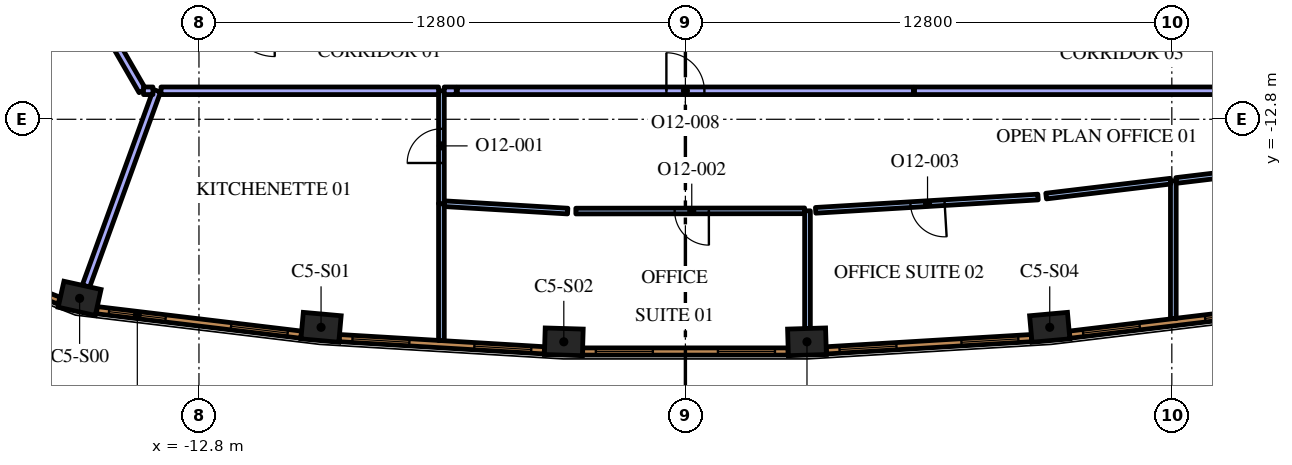
"""IFC4 building model, lengths in metres.
Left out: names, types, materials, properties, quantities, classifications, styles, units other than length and angle.
Written with IfcOpenShell. Run it as: python <this file> out.ifc"""

import sys

from ifc_helpers import new_model, si_unit, direction, frame, frame_2d, origin, origin_2d, place, context, subcontext, project, spatial, rectangle, extrude, element, fill, save


model = new_model("IFC4")
c1 = context("Model", 3, precision=1e-05, world=origin(), true_north=direction((0.0, 1.0)))
c2 = subcontext(c1, "Body", "Model", "MODEL_VIEW")
j1 = project(units=[si_unit("LENGTHUNIT", "METRE"), si_unit("PLANEANGLEUNIT", "RADIAN")], contexts=[c1])
p1 = place(None, origin())
s1 = spatial("IfcSite", under=j1, at=p1, CompositionType="ELEMENT")
p2 = place(p1, origin())
s2 = spatial("IfcBuilding", under=s1, at=p2, CompositionType="ELEMENT")
p3 = place(p2, frame((0.0, 0.0, 283.8)))
s3 = spatial("IfcBuildingStorey", under=s2, at=p3, CompositionType="ELEMENT", Elevation=283.8)
for number, where, z_axis, x_axis in (
    (1, (-15.941, -17.512, 0.0), (0.0, 0.0, 1.0), (0.976, -0.217, 0.0)),
    (2, (-9.587, -18.274, 0.0), (0.0, 0.0, 1.0), (0.996, -0.089, 0.0)),
    (3, (-3.199, -18.655, 0.0), (0.0, 0.0, 1.0), (1.0, -0.03, 0.0)),
    (4, (3.199, -18.655, 0.0), (0.0, 0.0, 1.0), (1.0, 0.03, 0.0)),
    (5, (9.587, -18.274, 0.0), (0.0, 0.0, 1.0), (0.996, 0.089, 0.0)),
):
    element("IfcColumn", number, at=place(p3, frame(where, z_axis=z_axis, x_axis=x_axis)), inside=s3, PredefinedType="COLUMN", context=c2, shape_type="SweptSolid", body=[
        extrude(rectangle(XDim=1.0, YDim=0.7, at=origin_2d()), origin(), (0.0, 0.0, 1.0), 4.2),
    ])
p4 = place(p3, frame((-6.42, -15.013, 0.0), z_axis=(0.0, 0.0, 1.0), x_axis=(0.0, -1.0, 0.0)))
e6 = element("IfcWall", 6, at=p4, inside=s3, PredefinedType="PARTITIONING", context=c2, shape_type="SweptSolid", body=[
    extrude(rectangle(XDim=3.61, YDim=0.15, at=frame_2d((1.805, 0.0))), origin(), (0.0, 0.0, 1.0), 3.55),
])
p5 = place(p3, frame((-6.42, -15.021, 0.0), z_axis=(0.0, 0.0, 1.0), x_axis=(0.0, 1.0, 0.0)))
e7 = element("IfcWall", 7, at=p5, inside=s3, PredefinedType="PARTITIONING", context=c2, shape_type="SweptSolid", body=[
    extrude(rectangle(XDim=2.971, YDim=0.15, at=frame_2d((1.485, 0.0))), origin(), (0.0, 0.0, 1.0), 3.55),
])
p6 = place(p5, frame((1.071, 0.0, 0.0)))
e8 = element("IfcOpeningElement", 8, at=p6, cuts=e7, PredefinedType="OPENING", context=c2, shape_type="SweptSolid", body=[
    extrude(rectangle(XDim=0.9, YDim=2.1, at=frame_2d((0.45, 1.05))), frame((0.0, 0.085, 0.0), z_axis=(0.0, -1.0, 0.0), x_axis=(1.0, 0.0, 0.0)), (0.0, 0.0, 1.0), 0.17),
])
p7 = place(p3, frame((-15.774, -17.19, 0.0), z_axis=(0.0, 0.0, 1.0), x_axis=(0.341821907823, 0.93976474893, 0.0)))
e9 = element("IfcWall", 9, at=p7, inside=s3, PredefinedType="PARTITIONING", context=c2, shape_type="SweptSolid", body=[
    extrude(rectangle(XDim=5.469, YDim=0.2, at=frame_2d((2.735, 0.0))), origin(), (0.0, 0.0, 1.0), 3.55),
])
p8 = place(p3, frame((-13.799, -12.05, 0.0), z_axis=(0.0, 0.0, 1.0), x_axis=(1.0, 0.0, 0.0)))
e10 = element("IfcWall", 10, at=p8, inside=s3, PredefinedType="PARTITIONING", context=c2, shape_type="SweptSolid", body=[
    extrude(rectangle(XDim=7.303, YDim=0.2, at=frame_2d((3.652, 0.0))), origin(), (0.0, 0.0, 1.0), 3.55),
])
p9 = place(p3, frame((3.213, -15.208, 0.0), z_axis=(0.0, 0.0, 1.0), x_axis=(0.0, -1.0, 0.0)))
e11 = element("IfcWall", 11, at=p9, inside=s3, PredefinedType="PARTITIONING", context=c2, shape_type="SweptSolid", body=[
    extrude(rectangle(XDim=3.096, YDim=0.15, at=frame_2d((1.548, 0.0))), origin(), (0.0, 0.0, 1.0), 3.55),
])
p10 = place(p3, frame((-6.345, -15.021, 0.0), z_axis=(0.0, 0.0, 1.0), x_axis=(0.998224081041, -0.059570832044, 0.0)))
e12 = element("IfcWall", 12, at=p10, inside=s3, PredefinedType="PARTITIONING", context=c2, shape_type="SweptSolid", body=[
    extrude(rectangle(XDim=3.254, YDim=0.15, at=frame_2d((1.627, 0.0))), origin(), (0.0, 0.0, 1.0), 3.55),
])
p11 = place(p3, frame((3.138, -15.208, 0.0), z_axis=(0.0, 0.0, 1.0), x_axis=(-0.999999400608, -0.001094889855, 0.0)))
e13 = element("IfcWall", 13, at=p11, inside=s3, PredefinedType="PARTITIONING", context=c2, shape_type="SweptSolid", body=[
    extrude(rectangle(XDim=6.021, YDim=0.15, at=frame_2d((3.01, 0.0))), origin(), (0.0, 0.0, 1.0), 3.55),
])
p12 = place(p11, frame((2.521, 0.0, 0.0)))
e14 = element("IfcOpeningElement", 14, at=p12, cuts=e13, PredefinedType="OPENING", context=c2, shape_type="SweptSolid", body=[
    extrude(rectangle(XDim=0.9, YDim=2.1, at=frame_2d((0.45, 1.05))), frame((0.0, 0.085, 0.0), z_axis=(0.0, -1.0, 0.0), x_axis=(1.0, 0.0, 0.0)), (0.0, 0.0, 1.0), 0.17),
])
p13 = place(p3, frame((12.839, -14.419, 0.0), z_axis=(0.0, 0.0, 1.0), x_axis=(0.0, -1.0, 0.0)))
e15 = element("IfcWall", 15, at=p13, inside=s3, PredefinedType="PARTITIONING", context=c2, shape_type="SweptSolid", body=[
    extrude(rectangle(XDim=3.626, YDim=0.15, at=frame_2d((1.813, 0.0))), origin(), (0.0, 0.0, 1.0), 3.55),
])
p14 = place(p3, frame((9.28, -14.846, 0.0), z_axis=(0.0, 0.0, 1.0), x_axis=(-0.998220544688, -0.059630060904, 0.0)))
e16 = element("IfcWall", 16, at=p14, inside=s3, PredefinedType="PARTITIONING", context=c2, shape_type="SweptSolid", body=[
    extrude(rectangle(XDim=5.863, YDim=0.15, at=frame_2d((2.932, 0.0))), origin(), (0.0, 0.0, 1.0), 3.55),
])
p15 = place(p14, frame((2.463, 0.0, 0.0)))
e17 = element("IfcOpeningElement", 17, at=p15, cuts=e16, PredefinedType="OPENING", context=c2, shape_type="SweptSolid", body=[
    extrude(rectangle(XDim=0.9, YDim=2.1, at=frame_2d((0.45, 1.05))), frame((0.0, 0.085, 0.0), z_axis=(0.0, -1.0, 0.0), x_axis=(1.0, 0.0, 0.0)), (0.0, 0.0, 1.0), 0.17),
])
p16 = place(p3, frame((9.492, -14.82, 0.0), z_axis=(0.0, 0.0, 1.0), x_axis=(0.992887701721, 0.119054658757, 0.0)))
e18 = element("IfcWall", 18, at=p16, inside=s3, PredefinedType="PARTITIONING", context=c2, shape_type="SweptSolid", body=[
    extrude(rectangle(XDim=3.295, YDim=0.15, at=frame_2d((1.648, 0.0))), origin(), (0.0, 0.0, 1.0), 3.55),
])
p17 = place(p3, frame((12.914, -14.41, 0.0), z_axis=(0.0, 0.0, 1.0), x_axis=(0.99288472801, 0.119079456181, 0.0)))
e19 = element("IfcWall", 19, at=p17, inside=s3, PredefinedType="PARTITIONING", context=c2, shape_type="SweptSolid", body=[
    extrude(rectangle(XDim=2.196, YDim=0.15, at=frame_2d((1.098, 0.0))), origin(), (0.0, 0.0, 1.0), 3.55),
])
p18 = place(p3, frame((-6.0, -12.05, 0.0), z_axis=(0.0, 0.0, 1.0), x_axis=(1.0, 0.0, 0.0)))
e20 = element("IfcWall", 20, at=p18, inside=s3, PredefinedType="PARTITIONING", context=c2, shape_type="SweptSolid", body=[
    extrude(rectangle(XDim=12.0, YDim=0.2, at=frame_2d((6.0, 0.0))), origin(), (0.0, 0.0, 1.0), 3.55),
])
p19 = place(p18, frame((5.5, 0.0, 0.0)))
e21 = element("IfcOpeningElement", 21, at=p19, cuts=e20, PredefinedType="OPENING", context=c2, shape_type="SweptSolid", body=[
    extrude(rectangle(XDim=1.0, YDim=2.1, at=frame_2d((0.5, 1.05))), frame((0.0, 0.11, 0.0), z_axis=(0.0, -1.0, 0.0), x_axis=(1.0, 0.0, 0.0)), (0.0, 0.0, 1.0), 0.22),
])
p20 = place(p3, frame((-6.345, -12.05, 0.0), z_axis=(0.0, 0.0, 1.0), x_axis=(1.0, 0.0, 0.0)))
e22 = element("IfcWall", 22, at=p20, inside=s3, PredefinedType="PARTITIONING", context=c2, shape_type="SweptSolid", body=[
    extrude(rectangle(XDim=0.315, YDim=0.2, at=frame_2d((0.158, 0.0))), origin(), (0.0, 0.0, 1.0), 3.55),
])
p21 = place(p3, frame((6.03, -12.05, 0.0), z_axis=(0.0, 0.0, 1.0), x_axis=(1.0, 0.0, 0.0)))
e23 = element("IfcWall", 23, at=p21, inside=s3, PredefinedType="PARTITIONING", context=c2, shape_type="SweptSolid", body=[
    extrude(rectangle(XDim=8.259, YDim=0.2, at=frame_2d((4.13, 0.0))), origin(), (0.0, 0.0, 1.0), 3.55),
])
p22 = place(p3, frame((-17.218, -6.978, 0.0), z_axis=(0.0, 0.0, 1.0), x_axis=(0.500012299885, -0.866018302326, 0.0)))
e24 = element("IfcWall", 24, at=p22, inside=s3, PredefinedType="PARTITIONING", context=c2, shape_type="SweptSolid", body=[
    extrude(rectangle(XDim=5.857, YDim=0.2, at=frame_2d((2.929, 0.0))), origin(), (0.0, 0.0, 1.0), 3.55),
])
p23 = place(p3, frame((-14.26, -12.05, 0.0), z_axis=(0.0, 0.0, 1.0), x_axis=(1.0, 0.0, 0.0)))
e25 = element("IfcWall", 25, at=p23, inside=s3, PredefinedType="PARTITIONING", context=c2, shape_type="SweptSolid", body=[
    extrude(rectangle(XDim=0.248, YDim=0.2, at=frame_2d((0.124, 0.0))), origin(), (0.0, 0.0, 1.0), 3.55),
])
p24 = place(p3, frame((-15.487, -17.823, 0.0), z_axis=(0.0, 0.0, 1.0), x_axis=(0.992885582795, -0.119072328769, 0.0)))
e26 = element("IfcWall", 26, at=p24, inside=s3, PredefinedType="SOLIDWALL", context=c2, shape_type="SweptSolid", body=[
    extrude(rectangle(XDim=5.415, YDim=0.19, at=frame_2d((2.708, 0.0))), origin(), (0.0, 0.0, 1.0), 3.95),
])
p25 = place(p24, frame((0.323, 0.0, 0.6)))
e27 = element("IfcOpeningElement", 27, at=p25, cuts=e26, PredefinedType="OPENING", context=c2, shape_type="SweptSolid", body=[
    extrude(rectangle(XDim=1.5, YDim=2.85, at=frame_2d((0.75, 1.425))), frame((0.0, 0.105, 0.0), z_axis=(0.0, -1.0, 0.0), x_axis=(1.0, 0.0, 0.0)), (0.0, 0.0, 1.0), 0.21),
])
p26 = place(p24, frame((3.558, 0.0, 0.6)))
e28 = element("IfcOpeningElement", 28, at=p26, cuts=e26, PredefinedType="OPENING", context=c2, shape_type="SweptSolid", body=[
    extrude(rectangle(XDim=1.5, YDim=2.85, at=frame_2d((0.75, 1.425))), frame((0.0, 0.105, 0.0), z_axis=(0.0, -1.0, 0.0), x_axis=(1.0, 0.0, 0.0)), (0.0, 0.0, 1.0), 0.21),
])
p27 = place(p3, frame((-9.107, -18.558, 0.0), z_axis=(0.0, 0.0, 1.0), x_axis=(0.998221492823, -0.059614186786, 0.0)))
e29 = element("IfcWall", 29, at=p27, inside=s3, PredefinedType="SOLIDWALL", context=c2, shape_type="SweptSolid", body=[
    extrude(rectangle(XDim=5.406, YDim=0.19, at=frame_2d((2.703, 0.0))), origin(), (0.0, 0.0, 1.0), 3.95),
])
p28 = place(p27, frame((0.346, 0.0, 0.6)))
e30 = element("IfcOpeningElement", 30, at=p28, cuts=e29, PredefinedType="OPENING", context=c2, shape_type="SweptSolid", body=[
    extrude(rectangle(XDim=1.5, YDim=2.85, at=frame_2d((0.75, 1.425))), frame((0.0, 0.105, 0.0), z_axis=(0.0, -1.0, 0.0), x_axis=(1.0, 0.0, 0.0)), (0.0, 0.0, 1.0), 0.21),
])
p29 = place(p27, frame((3.559, 0.0, 0.6)))
e31 = element("IfcOpeningElement", 31, at=p29, cuts=e29, PredefinedType="OPENING", context=c2, shape_type="SweptSolid", body=[
    extrude(rectangle(XDim=1.5, YDim=2.85, at=frame_2d((0.75, 1.425))), frame((0.0, 0.105, 0.0), z_axis=(0.0, -1.0, 0.0), x_axis=(1.0, 0.0, 0.0)), (0.0, 0.0, 1.0), 0.21),
])
p30 = place(p3, frame((-2.703, -18.91, 0.0), z_axis=(0.0, 0.0, 1.0), x_axis=(1.0, 0.0, 0.0)))
e32 = element("IfcWall", 32, at=p30, inside=s3, PredefinedType="SOLIDWALL", context=c2, shape_type="SweptSolid", body=[
    extrude(rectangle(XDim=5.406, YDim=0.19, at=frame_2d((2.703, 0.0))), origin(), (0.0, 0.0, 1.0), 3.95),
])
p31 = place(p30, frame((0.346, 0.0, 0.6)))
e33 = element("IfcOpeningElement", 33, at=p31, cuts=e32, PredefinedType="OPENING", context=c2, shape_type="SweptSolid", body=[
    extrude(rectangle(XDim=1.5, YDim=2.85, at=frame_2d((0.75, 1.425))), frame((0.0, 0.105, 0.0), z_axis=(0.0, -1.0, 0.0), x_axis=(1.0, 0.0, 0.0)), (0.0, 0.0, 1.0), 0.21),
])
p32 = place(p30, frame((3.56, 0.0, 0.6)))
e34 = element("IfcOpeningElement", 34, at=p32, cuts=e32, PredefinedType="OPENING", context=c2, shape_type="SweptSolid", body=[
    extrude(rectangle(XDim=1.5, YDim=2.85, at=frame_2d((0.75, 1.425))), frame((0.0, 0.105, 0.0), z_axis=(0.0, -1.0, 0.0), x_axis=(1.0, 0.0, 0.0)), (0.0, 0.0, 1.0), 0.21),
])
p33 = place(p3, frame((3.71, -18.88, 0.0), z_axis=(0.0, 0.0, 1.0), x_axis=(0.998221492823, 0.059614186786, 0.0)))
e35 = element("IfcWall", 35, at=p33, inside=s3, PredefinedType="SOLIDWALL", context=c2, shape_type="SweptSolid", body=[
    extrude(rectangle(XDim=5.406, YDim=0.19, at=frame_2d((2.703, 0.0))), origin(), (0.0, 0.0, 1.0), 3.95),
])
p34 = place(p33, frame((0.346, 0.0, 0.6)))
e36 = element("IfcOpeningElement", 36, at=p34, cuts=e35, PredefinedType="OPENING", context=c2, shape_type="SweptSolid", body=[
    extrude(rectangle(XDim=1.5, YDim=2.85, at=frame_2d((0.75, 1.425))), frame((0.0, 0.105, 0.0), z_axis=(0.0, -1.0, 0.0), x_axis=(1.0, 0.0, 0.0)), (0.0, 0.0, 1.0), 0.21),
])
p35 = place(p33, frame((3.559, 0.0, 0.6)))
e37 = element("IfcOpeningElement", 37, at=p35, cuts=e35, PredefinedType="OPENING", context=c2, shape_type="SweptSolid", body=[
    extrude(rectangle(XDim=1.5, YDim=2.85, at=frame_2d((0.75, 1.425))), frame((0.0, 0.105, 0.0), z_axis=(0.0, -1.0, 0.0), x_axis=(1.0, 0.0, 0.0)), (0.0, 0.0, 1.0), 0.21),
])
p36 = place(p3, frame((10.111, -18.468, 0.0), z_axis=(0.0, 0.0, 1.0), x_axis=(0.992885582795, 0.119072328769, 0.0)))
e38 = element("IfcWall", 38, at=p36, inside=s3, PredefinedType="SOLIDWALL", context=c2, shape_type="SweptSolid", body=[
    extrude(rectangle(XDim=5.415, YDim=0.19, at=frame_2d((2.708, 0.0))), origin(), (0.0, 0.0, 1.0), 3.95),
])
p37 = place(p36, frame((0.357, 0.0, 0.6)))
e39 = element("IfcOpeningElement", 39, at=p37, cuts=e38, PredefinedType="OPENING", context=c2, shape_type="SweptSolid", body=[
    extrude(rectangle(XDim=1.5, YDim=2.85, at=frame_2d((0.75, 1.425))), frame((0.0, 0.105, 0.0), z_axis=(0.0, -1.0, 0.0), x_axis=(1.0, 0.0, 0.0)), (0.0, 0.0, 1.0), 0.21),
])
p38 = place(p36, frame((3.593, 0.0, 0.6)))
e40 = element("IfcOpeningElement", 40, at=p38, cuts=e38, PredefinedType="OPENING", context=c2, shape_type="SweptSolid", body=[
    extrude(rectangle(XDim=1.5, YDim=2.85, at=frame_2d((0.75, 1.425))), frame((0.0, 0.105, 0.0), z_axis=(0.0, -1.0, 0.0), x_axis=(1.0, 0.0, 0.0)), (0.0, 0.0, 1.0), 0.21),
])
p39 = place(p3, frame((-19.496, -16.392, 0.0), z_axis=(0.0, 0.0, 1.0), x_axis=(0.93100888477, -0.364996515709, 0.0)))
e41 = element("IfcWall", 41, at=p39, inside=s3, PredefinedType="SOLIDWALL", context=c2, shape_type="SweptSolid", body=[
    extrude(rectangle(XDim=3.237, YDim=0.19, at=frame_2d((1.618, 0.0))), origin(), (0.0, 0.0, 1.0), 3.95),
])
p40 = place(p39, frame((1.068, 0.0, 0.6)))
e42 = element("IfcOpeningElement", 42, at=p40, cuts=e41, PredefinedType="OPENING", context=c2, shape_type="SweptSolid", body=[
    extrude(rectangle(XDim=1.1, YDim=2.85, at=frame_2d((0.55, 1.425))), frame((0.0, 0.105, 0.0), z_axis=(0.0, -1.0, 0.0), x_axis=(1.0, 0.0, 0.0)), (0.0, 0.0, 1.0), 0.21),
])
p41 = place(p6, origin())
e43 = element("IfcDoor", 43, at=p41, inside=s3, OperationType="SINGLE_SWING_RIGHT", PredefinedType="DOOR", context=c2, shape_type="SweptSolid", body=[
    extrude(rectangle(XDim=0.9, YDim=2.1, at=frame_2d((0.45, 1.05))), frame((0.0, 0.025, 0.0), z_axis=(0.0, -1.0, 0.0), x_axis=(1.0, 0.0, 0.0)), (0.0, 0.0, 1.0), 0.05),
])
fill(e8, e43)
p42 = place(p12, origin())
e44 = element("IfcDoor", 44, at=p42, inside=s3, OperationType="SINGLE_SWING_LEFT", PredefinedType="DOOR", context=c2, shape_type="SweptSolid", body=[
    extrude(rectangle(XDim=0.9, YDim=2.1, at=frame_2d((0.45, 1.05))), frame((0.0, 0.025, 0.0), z_axis=(0.0, -1.0, 0.0), x_axis=(1.0, 0.0, 0.0)), (0.0, 0.0, 1.0), 0.05),
])
fill(e14, e44)
p43 = place(p15, origin())
e45 = element("IfcDoor", 45, at=p43, inside=s3, OperationType="SINGLE_SWING_LEFT", PredefinedType="DOOR", context=c2, shape_type="SweptSolid", body=[
    extrude(rectangle(XDim=0.9, YDim=2.1, at=frame_2d((0.45, 1.05))), frame((0.0, 0.025, 0.0), z_axis=(0.0, -1.0, 0.0), x_axis=(1.0, 0.0, 0.0)), (0.0, 0.0, 1.0), 0.05),
])
fill(e17, e45)
p44 = place(p19, origin())
e46 = element("IfcDoor", 46, at=p44, inside=s3, OperationType="SINGLE_SWING_RIGHT", PredefinedType="DOOR", context=c2, shape_type="SweptSolid", body=[
    extrude(rectangle(XDim=1.0, YDim=2.1, at=frame_2d((0.5, 1.05))), frame((0.0, 0.025, 0.0), z_axis=(0.0, -1.0, 0.0), x_axis=(1.0, 0.0, 0.0)), (0.0, 0.0, 1.0), 0.05),
])
fill(e21, e46)
p45 = place(p25, origin())
e47 = element("IfcWindow", 47, at=p45, inside=s3, PartitioningType="SINGLE_PANEL", PredefinedType="WINDOW", context=c2, shape_type="SweptSolid", body=[
    extrude(rectangle(XDim=1.5, YDim=2.85, at=frame_2d((0.75, 1.425))), frame((0.0, 0.045, 0.0), z_axis=(0.0, -1.0, 0.0), x_axis=(1.0, 0.0, 0.0)), (0.0, 0.0, 1.0), 0.06),
])
fill(e27, e47)
p46 = place(p26, origin())
e48 = element("IfcWindow", 48, at=p46, inside=s3, PartitioningType="SINGLE_PANEL", PredefinedType="WINDOW", context=c2, shape_type="SweptSolid", body=[
    extrude(rectangle(XDim=1.5, YDim=2.85, at=frame_2d((0.75, 1.425))), frame((0.0, 0.045, 0.0), z_axis=(0.0, -1.0, 0.0), x_axis=(1.0, 0.0, 0.0)), (0.0, 0.0, 1.0), 0.06),
])
fill(e28, e48)
p47 = place(p28, origin())
e49 = element("IfcWindow", 49, at=p47, inside=s3, PartitioningType="SINGLE_PANEL", PredefinedType="WINDOW", context=c2, shape_type="SweptSolid", body=[
    extrude(rectangle(XDim=1.5, YDim=2.85, at=frame_2d((0.75, 1.425))), frame((0.0, 0.045, 0.0), z_axis=(0.0, -1.0, 0.0), x_axis=(1.0, 0.0, 0.0)), (0.0, 0.0, 1.0), 0.06),
])
fill(e30, e49)
p48 = place(p29, origin())
e50 = element("IfcWindow", 50, at=p48, inside=s3, PartitioningType="SINGLE_PANEL", PredefinedType="WINDOW", context=c2, shape_type="SweptSolid", body=[
    extrude(rectangle(XDim=1.5, YDim=2.85, at=frame_2d((0.75, 1.425))), frame((0.0, 0.045, 0.0), z_axis=(0.0, -1.0, 0.0), x_axis=(1.0, 0.0, 0.0)), (0.0, 0.0, 1.0), 0.06),
])
fill(e31, e50)
p49 = place(p31, origin())
e51 = element("IfcWindow", 51, at=p49, inside=s3, PartitioningType="SINGLE_PANEL", PredefinedType="WINDOW", context=c2, shape_type="SweptSolid", body=[
    extrude(rectangle(XDim=1.5, YDim=2.85, at=frame_2d((0.75, 1.425))), frame((0.0, 0.045, 0.0), z_axis=(0.0, -1.0, 0.0), x_axis=(1.0, 0.0, 0.0)), (0.0, 0.0, 1.0), 0.06),
])
fill(e33, e51)
p50 = place(p32, origin())
e52 = element("IfcWindow", 52, at=p50, inside=s3, PartitioningType="SINGLE_PANEL", PredefinedType="WINDOW", context=c2, shape_type="SweptSolid", body=[
    extrude(rectangle(XDim=1.5, YDim=2.85, at=frame_2d((0.75, 1.425))), frame((0.0, 0.045, 0.0), z_axis=(0.0, -1.0, 0.0), x_axis=(1.0, 0.0, 0.0)), (0.0, 0.0, 1.0), 0.06),
])
fill(e34, e52)
p51 = place(p34, origin())
e53 = element("IfcWindow", 53, at=p51, inside=s3, PartitioningType="SINGLE_PANEL", PredefinedType="WINDOW", context=c2, shape_type="SweptSolid", body=[
    extrude(rectangle(XDim=1.5, YDim=2.85, at=frame_2d((0.75, 1.425))), frame((0.0, 0.045, 0.0), z_axis=(0.0, -1.0, 0.0), x_axis=(1.0, 0.0, 0.0)), (0.0, 0.0, 1.0), 0.06),
])
fill(e36, e53)
p52 = place(p35, origin())
e54 = element("IfcWindow", 54, at=p52, inside=s3, PartitioningType="SINGLE_PANEL", PredefinedType="WINDOW", context=c2, shape_type="SweptSolid", body=[
    extrude(rectangle(XDim=1.5, YDim=2.85, at=frame_2d((0.75, 1.425))), frame((0.0, 0.045, 0.0), z_axis=(0.0, -1.0, 0.0), x_axis=(1.0, 0.0, 0.0)), (0.0, 0.0, 1.0), 0.06),
])
fill(e37, e54)
p53 = place(p37, origin())
e55 = element("IfcWindow", 55, at=p53, inside=s3, PartitioningType="SINGLE_PANEL", PredefinedType="WINDOW", context=c2, shape_type="SweptSolid", body=[
    extrude(rectangle(XDim=1.5, YDim=2.85, at=frame_2d((0.75, 1.425))), frame((0.0, 0.045, 0.0), z_axis=(0.0, -1.0, 0.0), x_axis=(1.0, 0.0, 0.0)), (0.0, 0.0, 1.0), 0.06),
])
fill(e39, e55)
p54 = place(p38, origin())
e56 = element("IfcWindow", 56, at=p54, inside=s3, PartitioningType="SINGLE_PANEL", PredefinedType="WINDOW", context=c2, shape_type="SweptSolid", body=[
    extrude(rectangle(XDim=1.5, YDim=2.85, at=frame_2d((0.75, 1.425))), frame((0.0, 0.045, 0.0), z_axis=(0.0, -1.0, 0.0), x_axis=(1.0, 0.0, 0.0)), (0.0, 0.0, 1.0), 0.06),
])
fill(e40, e56)
save(model, sys.argv[1])
